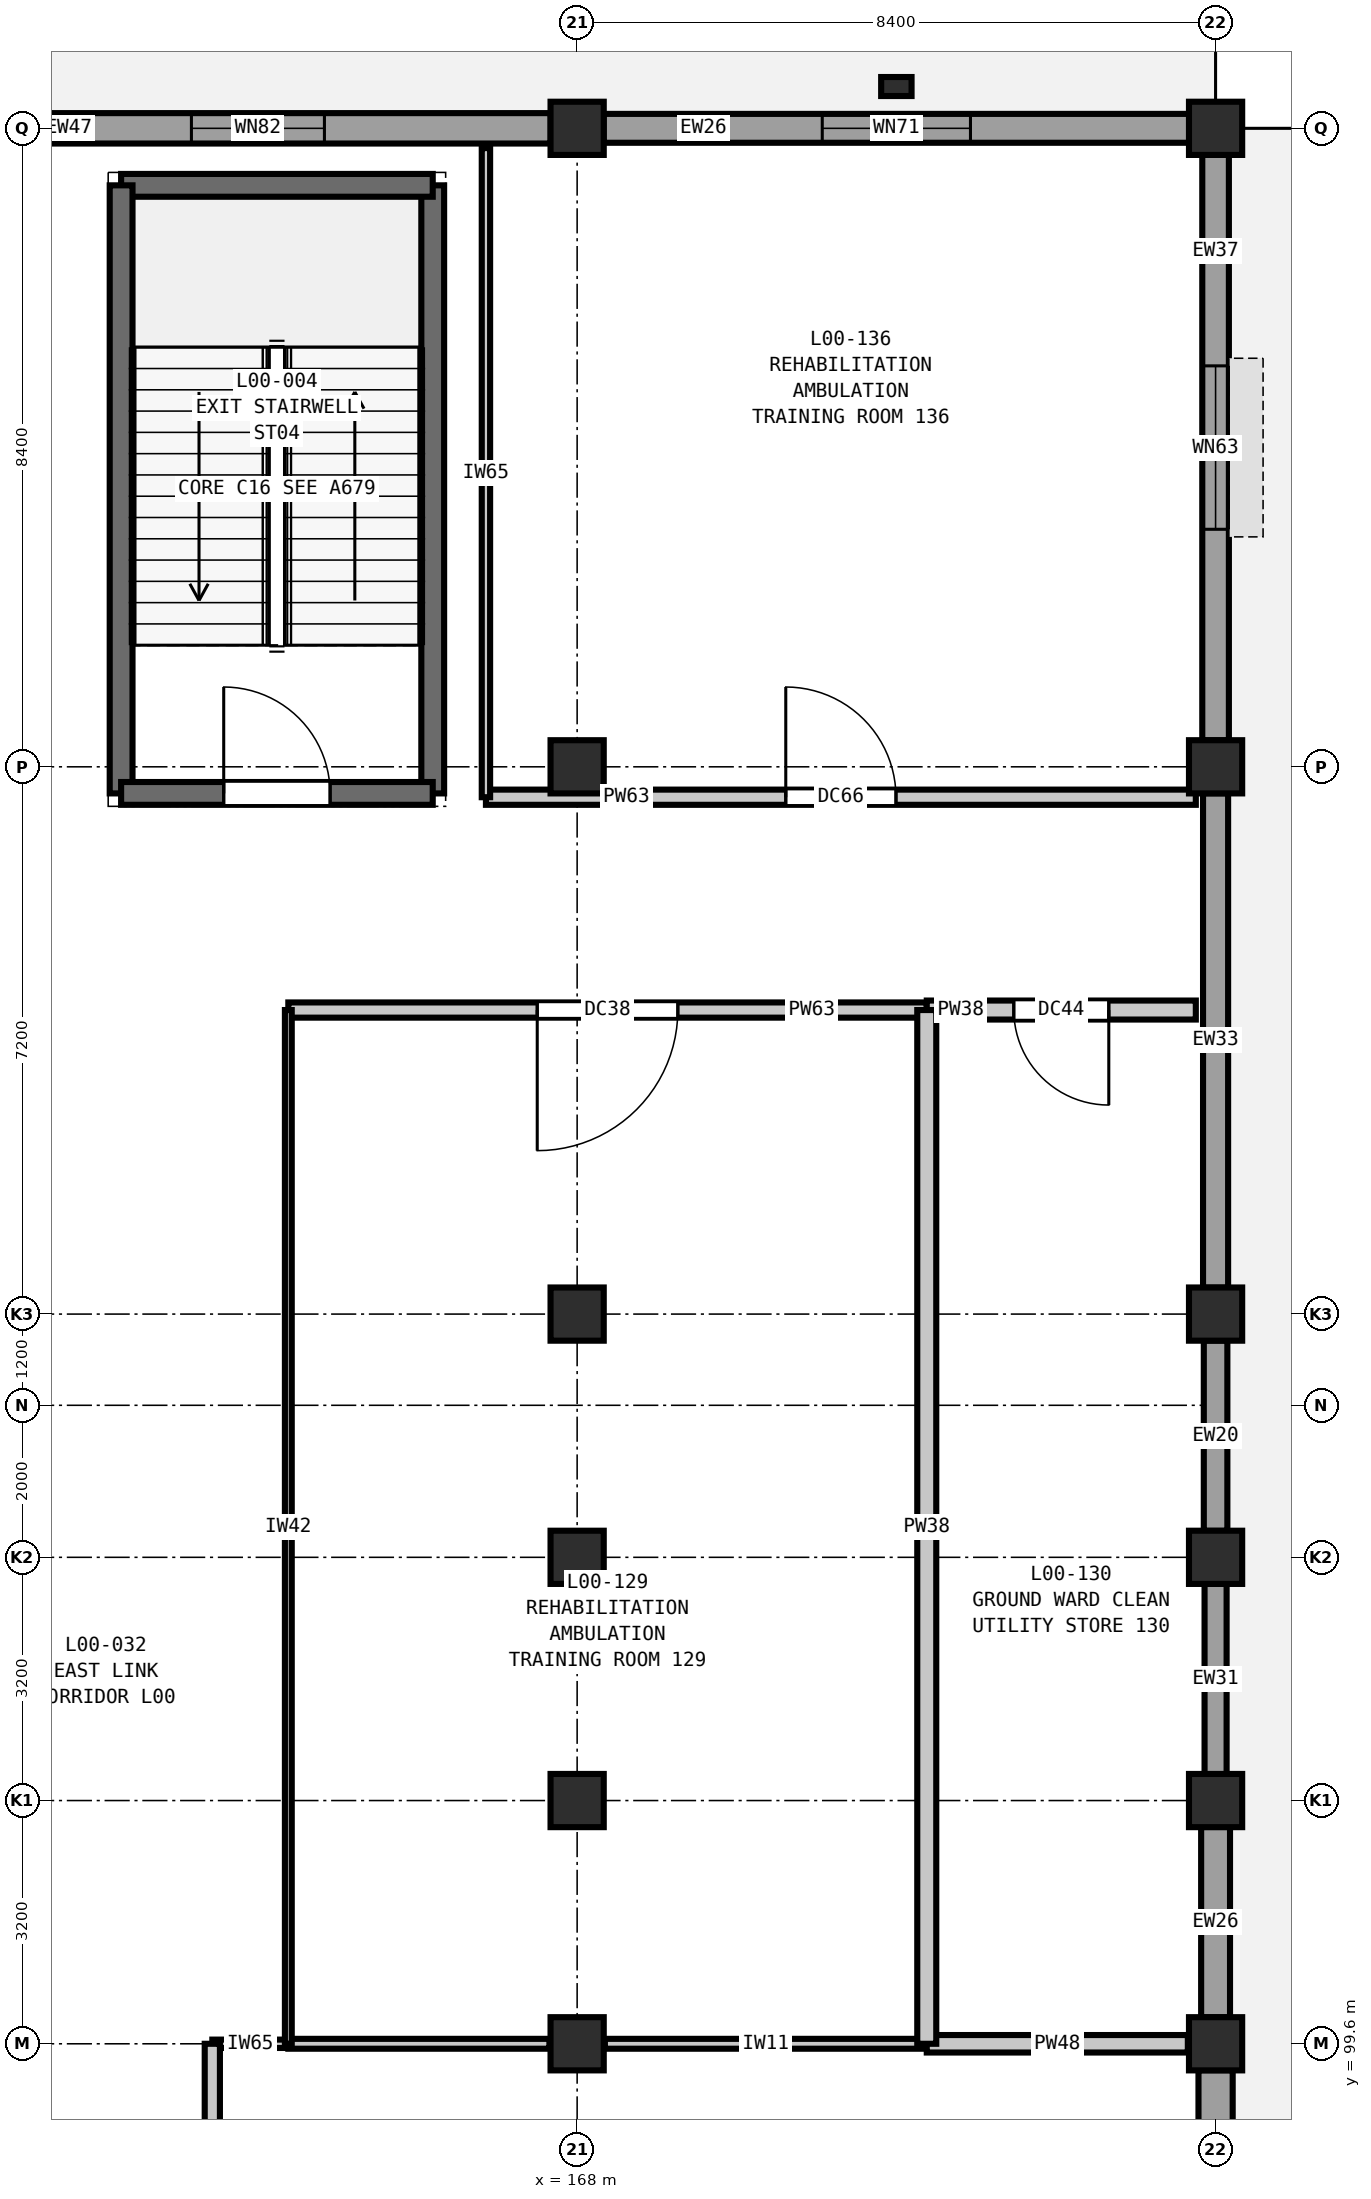
"""IFC4 building model, lengths in metres.
Left out: names, types, materials, properties, quantities, classifications, styles, units other than length and angle.
Written with IfcOpenShell. Run it as: python <this file> out.ifc"""

import sys

from ifc_helpers import new_model, si_unit, direction, frame, frame_2d, origin, origin_2d, place, context, subcontext, project, spatial, rectangle, extrude, element, fill, save


model = new_model("IFC4")
c1 = context("Model", 3, precision=1e-05, world=origin(), true_north=direction((0.0, 1.0)))
c2 = subcontext(c1, "Body", "Model", "MODEL_VIEW")
j1 = project(units=[si_unit("LENGTHUNIT", "METRE"), si_unit("PLANEANGLEUNIT", "RADIAN")], contexts=[c1])
p1 = place(None, origin())
s1 = spatial("IfcSite", under=j1, at=p1, CompositionType="ELEMENT")
p2 = place(p1, origin())
s2 = spatial("IfcBuilding", under=s1, at=p2, CompositionType="ELEMENT")
p3 = place(p2, origin())
s3 = spatial("IfcBuildingStorey", under=s2, at=p3, CompositionType="ELEMENT", Elevation=0.0)
for number, where, z_axis, x_axis in (
    (1, (168.0, 99.6, 0.0), (0.0, 0.0, 1.0), (1.0, 0.0, 0.0)),
    (2, (168.0, 102.8, 0.0), (0.0, 0.0, 1.0), (1.0, 0.0, 0.0)),
    (3, (168.0, 106.0, 0.0), (0.0, 0.0, 1.0), (1.0, 0.0, 0.0)),
    (4, (168.0, 109.2, 0.0), (0.0, 0.0, 1.0), (1.0, 0.0, 0.0)),
    (5, (168.0, 116.4, 0.0), (0.0, 0.0, 1.0), (1.0, 0.0, 0.0)),
    (6, (168.0, 124.8, 0.0), (0.0, 0.0, 1.0), (1.0, 0.0, 0.0)),
    (7, (176.4, 99.6, 0.0), (0.0, 0.0, 1.0), (1.0, 0.0, 0.0)),
    (8, (176.4, 102.8, 0.0), (0.0, 0.0, 1.0), (1.0, 0.0, 0.0)),
    (9, (176.4, 106.0, 0.0), (0.0, 0.0, 1.0), (1.0, 0.0, 0.0)),
    (10, (176.4, 109.2, 0.0), (0.0, 0.0, 1.0), (1.0, 0.0, 0.0)),
    (11, (176.4, 116.4, 0.0), (0.0, 0.0, 1.0), (1.0, 0.0, 0.0)),
    (12, (176.4, 124.8, 0.0), (0.0, 0.0, 1.0), (1.0, 0.0, 0.0)),
):
    element("IfcColumn", number, at=place(p3, frame(where, z_axis=z_axis, x_axis=x_axis)), inside=s3, PredefinedType="COLUMN", context=c2, shape_type="SweptSolid", body=[
        extrude(rectangle(XDim=0.7, YDim=0.7, at=origin_2d()), origin(), (0.0, 0.0, 1.0), 5.4),
    ])
p4 = place(p3, frame((172.2, 125.35, 0.0), z_axis=(0.0, 0.0, 1.0), x_axis=(1.0, 0.0, 0.0)))
e13 = element("IfcColumn", 13, at=p4, inside=s3, PredefinedType="PILASTER", context=c2, shape_type="SweptSolid", body=[
    extrude(rectangle(XDim=0.4, YDim=0.25, at=origin_2d()), origin(), (0.0, 0.0, 1.0), 5.4),
])
p5 = place(p3, frame((159.948, 124.8, 0.0), z_axis=(0.0, 0.0, 1.0), x_axis=(1.0, 0.0, 0.0)))
e14 = element("IfcWall", 14, at=p5, inside=s3, PredefinedType="SOLIDWALL", context=c2, shape_type="SweptSolid", body=[
    extrude(rectangle(XDim=7.704, YDim=0.4, at=frame_2d((3.852, 0.0))), origin(), (0.0, 0.0, 1.0), 4.68),
])
p6 = place(p5, frame((2.977, 0.0, 0.9)))
e15 = element("IfcOpeningElement", 15, at=p6, cuts=e14, PredefinedType="OPENING", context=c2, shape_type="SweptSolid", body=[
    extrude(rectangle(XDim=1.75, YDim=1.75, at=frame_2d((0.875, 0.875))), frame((0.0, 0.21, 0.0), z_axis=(0.0, -1.0, 0.0), x_axis=(1.0, 0.0, 0.0)), (0.0, 0.0, 1.0), 0.42),
])
p7 = place(p3, frame((168.348, 124.8, 0.0), z_axis=(0.0, 0.0, 1.0), x_axis=(1.0, 0.0, 0.0)))
e16 = element("IfcWall", 16, at=p7, inside=s3, PredefinedType="SOLIDWALL", context=c2, shape_type="SweptSolid", body=[
    extrude(rectangle(XDim=7.704, YDim=0.38, at=frame_2d((3.852, 0.0))), origin(), (0.0, 0.0, 1.0), 4.68),
])
p8 = place(p7, frame((2.877, 0.0, 0.9)))
e17 = element("IfcOpeningElement", 17, at=p8, cuts=e16, PredefinedType="OPENING", context=c2, shape_type="SweptSolid", body=[
    extrude(rectangle(XDim=1.95, YDim=1.75, at=frame_2d((0.975, 0.875))), frame((0.0, 0.2, 0.0), z_axis=(0.0, -1.0, 0.0), x_axis=(1.0, 0.0, 0.0)), (0.0, 0.0, 1.0), 0.4),
])
p9 = place(p3, frame((176.4, 124.452, 0.0), z_axis=(0.0, 0.0, 1.0), x_axis=(0.0, -1.0, 0.0)))
e18 = element("IfcWall", 18, at=p9, inside=s3, PredefinedType="SOLIDWALL", context=c2, shape_type="SweptSolid", body=[
    extrude(rectangle(XDim=7.704, YDim=0.35, at=frame_2d((3.852, 0.0))), origin(), (0.0, 0.0, 1.0), 4.68),
])
p10 = place(p9, frame((2.777, 0.0, 0.9)))
e19 = element("IfcOpeningElement", 19, at=p10, cuts=e18, PredefinedType="OPENING", context=c2, shape_type="SweptSolid", body=[
    extrude(rectangle(XDim=2.15, YDim=1.75, at=frame_2d((1.075, 0.875))), frame((0.0, 0.185, 0.0), z_axis=(0.0, -1.0, 0.0), x_axis=(1.0, 0.0, 0.0)), (0.0, 0.0, 1.0), 0.37),
])
p11 = place(p3, frame((176.4, 116.052, 0.0), z_axis=(0.0, 0.0, 1.0), x_axis=(0.0, -1.0, 0.0)))
e20 = element("IfcWall", 20, at=p11, inside=s3, PredefinedType="SOLIDWALL", context=c2, shape_type="SweptSolid", body=[
    extrude(rectangle(XDim=6.504, YDim=0.33, at=frame_2d((3.252, 0.0))), origin(), (0.0, 0.0, 1.0), 4.68),
])
p12 = place(p3, frame((176.4, 108.852, 0.0), z_axis=(0.0, 0.0, 1.0), x_axis=(0.0, -1.0, 0.0)))
e21 = element("IfcWall", 21, at=p12, inside=s3, PredefinedType="SOLIDWALL", context=c2, shape_type="SweptSolid", body=[
    extrude(rectangle(XDim=2.504, YDim=0.31, at=frame_2d((1.252, 0.0))), origin(), (0.0, 0.0, 1.0), 4.68),
])
p13 = place(p3, frame((176.4, 105.652, 0.0), z_axis=(0.0, 0.0, 1.0), x_axis=(0.0, -1.0, 0.0)))
e22 = element("IfcWall", 22, at=p13, inside=s3, PredefinedType="SOLIDWALL", context=c2, shape_type="SweptSolid", body=[
    extrude(rectangle(XDim=2.504, YDim=0.29, at=frame_2d((1.252, 0.0))), origin(), (0.0, 0.0, 1.0), 4.68),
])
p14 = place(p3, frame((176.4, 102.452, 0.0), z_axis=(0.0, 0.0, 1.0), x_axis=(0.0, -1.0, 0.0)))
e23 = element("IfcWall", 23, at=p14, inside=s3, PredefinedType="SOLIDWALL", context=c2, shape_type="SweptSolid", body=[
    extrude(rectangle(XDim=2.504, YDim=0.38, at=frame_2d((1.252, 0.0))), origin(), (0.0, 0.0, 1.0), 4.68),
])
p15 = place(p3, frame((176.4, 99.252, 0.0), z_axis=(0.0, 0.0, 1.0), x_axis=(0.0, -1.0, 0.0)))
e24 = element("IfcWall", 24, at=p15, inside=s3, PredefinedType="SOLIDWALL", context=c2, shape_type="SweptSolid", body=[
    extrude(rectangle(XDim=7.704, YDim=0.45, at=frame_2d((3.852, 0.0))), origin(), (0.0, 0.0, 1.0), 4.68),
])
p16 = place(p15, frame((2.677, 0.0, 0.9)))
e25 = element("IfcOpeningElement", 25, at=p16, cuts=e24, PredefinedType="OPENING", context=c2, shape_type="SweptSolid", body=[
    extrude(rectangle(XDim=2.35, YDim=1.75, at=frame_2d((1.175, 0.875))), frame((0.0, 0.235, 0.0), z_axis=(0.0, -1.0, 0.0), x_axis=(1.0, 0.0, 0.0)), (0.0, 0.0, 1.0), 0.47),
])
p17 = place(p3, frame((166.1, 116.05, 0.0), z_axis=(0.0, 0.0, 1.0), x_axis=(0.0, 1.0, 0.0)))
e26 = element("IfcWall", 26, at=p17, inside=s3, PredefinedType="SHEAR", context=c2, shape_type="SweptSolid", body=[
    extrude(rectangle(XDim=8.0, YDim=0.3, at=frame_2d((4.0, 0.0))), origin(), (0.0, 0.0, 1.0), 5.4),
])
p18 = place(p3, frame((166.1, 124.05, 0.0), z_axis=(0.0, 0.0, 1.0), x_axis=(-1.0, 0.0, 0.0)))
e27 = element("IfcWall", 27, at=p18, inside=s3, PredefinedType="SHEAR", context=c2, shape_type="SweptSolid", body=[
    extrude(rectangle(XDim=4.1, YDim=0.3, at=frame_2d((2.05, 0.0))), origin(), (0.0, 0.0, 1.0), 5.4),
])
p19 = place(p3, frame((162.0, 124.05, 0.0), z_axis=(0.0, 0.0, 1.0), x_axis=(0.0, -1.0, 0.0)))
e28 = element("IfcWall", 28, at=p19, inside=s3, PredefinedType="SHEAR", context=c2, shape_type="SweptSolid", body=[
    extrude(rectangle(XDim=8.0, YDim=0.3, at=frame_2d((4.0, 0.0))), origin(), (0.0, 0.0, 1.0), 5.4),
])
p20 = place(p3, frame((162.0, 116.05, 0.0), z_axis=(0.0, 0.0, 1.0), x_axis=(1.0, 0.0, 0.0)))
e29 = element("IfcWall", 29, at=p20, inside=s3, PredefinedType="SHEAR", context=c2, shape_type="SweptSolid", body=[
    extrude(rectangle(XDim=4.1, YDim=0.3, at=frame_2d((2.05, 0.0))), origin(), (0.0, 0.0, 1.0), 5.4),
])
p21 = place(p20, frame((1.35, 0.0, 0.0)))
e30 = element("IfcOpeningElement", 30, at=p21, cuts=e29, PredefinedType="OPENING", context=c2, shape_type="SweptSolid", body=[
    extrude(rectangle(XDim=1.4, YDim=2.2, at=frame_2d((0.7, 1.1))), frame((0.0, 0.16, 0.0), z_axis=(0.0, -1.0, 0.0), x_axis=(1.0, 0.0, 0.0)), (0.0, 0.0, 1.0), 0.32),
])
p22 = place(p3, frame((163.2, 99.6, 0.0), z_axis=(0.0, 0.0, 1.0), x_axis=(1.0, 0.0, 0.0)))
e31 = element("IfcWall", 31, at=p22, inside=s3, PredefinedType="PARTITIONING", context=c2, shape_type="SweptSolid", body=[
    extrude(rectangle(XDim=1.0, YDim=0.11, at=frame_2d((0.5, 0.0))), origin(), (0.0, 0.0, 1.0), 4.635),
])
p23 = place(p3, frame((168.365, 99.6, 0.0), z_axis=(0.0, 0.0, 1.0), x_axis=(1.0, 0.0, 0.0)))
e32 = element("IfcWall", 32, at=p23, inside=s3, PredefinedType="PARTITIONING", context=c2, shape_type="SweptSolid", body=[
    extrude(rectangle(XDim=4.235, YDim=0.13, at=frame_2d((2.118, 0.0))), origin(), (0.0, 0.0, 1.0), 4.635),
])
p24 = place(p3, frame((164.2, 99.6, 0.0), z_axis=(0.0, 0.0, 1.0), x_axis=(1.0, 0.0, 0.0)))
e33 = element("IfcWall", 33, at=p24, inside=s3, PredefinedType="PARTITIONING", context=c2, shape_type="SweptSolid", body=[
    extrude(rectangle(XDim=3.435, YDim=0.13, at=frame_2d((1.718, 0.0))), origin(), (0.0, 0.0, 1.0), 4.635),
])
p25 = place(p3, frame((172.6, 99.6, 0.0), z_axis=(0.0, 0.0, 1.0), x_axis=(1.0, 0.0, 0.0)))
e34 = element("IfcWall", 34, at=p25, inside=s3, PredefinedType="PARTITIONING", context=c2, shape_type="SweptSolid", body=[
    extrude(rectangle(XDim=3.435, YDim=0.23, at=frame_2d((1.717, 0.0))), origin(), (0.0, 0.0, 1.0), 4.635),
])
p26 = place(p3, frame((164.2, 113.2, 0.0), z_axis=(0.0, 0.0, 1.0), x_axis=(1.0, 0.0, 0.0)))
e35 = element("IfcWall", 35, at=p26, inside=s3, PredefinedType="PARTITIONING", context=c2, shape_type="SweptSolid", body=[
    extrude(rectangle(XDim=8.4, YDim=0.2, at=frame_2d((4.2, 0.0))), origin(), (0.0, 0.0, 1.0), 5.04),
])
p27 = place(p26, frame((3.275, 0.0, 0.0)))
e36 = element("IfcOpeningElement", 36, at=p27, cuts=e35, PredefinedType="OPENING", context=c2, shape_type="SweptSolid", body=[
    extrude(rectangle(XDim=1.85, YDim=2.3, at=frame_2d((0.925, 1.15))), frame((0.0, 0.11, 0.0), z_axis=(0.0, -1.0, 0.0), x_axis=(1.0, 0.0, 0.0)), (0.0, 0.0, 1.0), 0.22),
])
p28 = place(p3, frame((172.6, 113.2, 0.0), z_axis=(0.0, 0.0, 1.0), x_axis=(1.0, 0.0, 0.0)))
e37 = element("IfcWall", 37, at=p28, inside=s3, PredefinedType="PARTITIONING", context=c2, shape_type="SweptSolid", body=[
    extrude(rectangle(XDim=3.54, YDim=0.25, at=frame_2d((1.77, 0.0))), origin(), (0.0, 0.0, 1.0), 5.04),
])
p29 = place(p28, frame((1.145, 0.0, 0.0)))
e38 = element("IfcOpeningElement", 38, at=p29, cuts=e37, PredefinedType="OPENING", context=c2, shape_type="SweptSolid", body=[
    extrude(rectangle(XDim=1.25, YDim=2.15, at=frame_2d((0.625, 1.075))), frame((0.0, 0.135, 0.0), z_axis=(0.0, -1.0, 0.0), x_axis=(1.0, 0.0, 0.0)), (0.0, 0.0, 1.0), 0.27),
])
p30 = place(p3, frame((166.8, 116.0, 0.0), z_axis=(0.0, 0.0, 1.0), x_axis=(1.0, 0.0, 0.0)))
e39 = element("IfcWall", 39, at=p30, inside=s3, PredefinedType="PARTITIONING", context=c2, shape_type="SweptSolid", body=[
    extrude(rectangle(XDim=9.34, YDim=0.2, at=frame_2d((4.67, 0.0))), origin(), (0.0, 0.0, 1.0), 5.04),
])
p31 = place(p30, frame((3.945, 0.0, 0.0)))
e40 = element("IfcOpeningElement", 40, at=p31, cuts=e39, PredefinedType="OPENING", context=c2, shape_type="SweptSolid", body=[
    extrude(rectangle(XDim=1.45, YDim=2.25, at=frame_2d((0.725, 1.125))), frame((0.0, 0.11, 0.0), z_axis=(0.0, -1.0, 0.0), x_axis=(1.0, 0.0, 0.0)), (0.0, 0.0, 1.0), 0.22),
])
p32 = place(p3, frame((163.2, 89.2, 0.0), z_axis=(0.0, 0.0, 1.0), x_axis=(0.0, 1.0, 0.0)))
e41 = element("IfcWall", 41, at=p32, inside=s3, PredefinedType="PARTITIONING", context=c2, shape_type="SweptSolid", body=[
    extrude(rectangle(XDim=10.4, YDim=0.2, at=frame_2d((5.2, 0.0))), origin(), (0.0, 0.0, 1.0), 5.04),
])
p33 = place(p32, frame((4.35, 0.0, 0.0)))
e42 = element("IfcOpeningElement", 42, at=p33, cuts=e41, PredefinedType="OPENING", context=c2, shape_type="SweptSolid", body=[
    extrude(rectangle(XDim=1.7, YDim=2.3, at=frame_2d((0.85, 1.15))), frame((0.0, 0.11, 0.0), z_axis=(0.0, -1.0, 0.0), x_axis=(1.0, 0.0, 0.0)), (0.0, 0.0, 1.0), 0.22),
])
p34 = place(p3, frame((164.2, 99.6, 0.0), z_axis=(0.0, 0.0, 1.0), x_axis=(0.0, 1.0, 0.0)))
e43 = element("IfcWall", 43, at=p34, inside=s3, PredefinedType="PARTITIONING", context=c2, shape_type="SweptSolid", body=[
    extrude(rectangle(XDim=13.6, YDim=0.09, at=frame_2d((6.8, 0.0))), origin(), (0.0, 0.0, 1.0), 5.04),
])
p35 = place(p3, frame((166.8, 116.0, 0.0), z_axis=(0.0, 0.0, 1.0), x_axis=(0.0, 1.0, 0.0)))
e44 = element("IfcWall", 44, at=p35, inside=s3, PredefinedType="PARTITIONING", context=c2, shape_type="SweptSolid", body=[
    extrude(rectangle(XDim=8.54, YDim=0.11, at=frame_2d((4.27, 0.0))), origin(), (0.0, 0.0, 1.0), 5.04),
])
p36 = place(p3, frame((172.6, 99.6, 0.0), z_axis=(0.0, 0.0, 1.0), x_axis=(0.0, 1.0, 0.0)))
e45 = element("IfcWall", 45, at=p36, inside=s3, PredefinedType="PARTITIONING", context=c2, shape_type="SweptSolid", body=[
    extrude(rectangle(XDim=13.6, YDim=0.25, at=frame_2d((6.8, 0.0))), origin(), (0.0, 0.0, 1.0), 5.04),
])
p37 = place(p6, origin())
e46 = element("IfcWindow", 46, at=p37, inside=s3, PartitioningType="DOUBLE_PANEL_VERTICAL", PredefinedType="WINDOW", context=c2, shape_type="SweptSolid", body=[
    extrude(rectangle(XDim=1.75, YDim=1.75, at=frame_2d((0.875, 0.875))), frame((0.0, 0.03, 0.0), z_axis=(0.0, -1.0, 0.0), x_axis=(1.0, 0.0, 0.0)), (0.0, 0.0, 1.0), 0.06),
])
fill(e15, e46)
p38 = place(p8, origin())
e47 = element("IfcWindow", 47, at=p38, inside=s3, PartitioningType="DOUBLE_PANEL_VERTICAL", PredefinedType="WINDOW", context=c2, shape_type="SweptSolid", body=[
    extrude(rectangle(XDim=1.95, YDim=1.75, at=frame_2d((0.975, 0.875))), frame((0.0, 0.03, 0.0), z_axis=(0.0, -1.0, 0.0), x_axis=(1.0, 0.0, 0.0)), (0.0, 0.0, 1.0), 0.06),
])
fill(e17, e47)
p39 = place(p10, origin())
e48 = element("IfcWindow", 48, at=p39, inside=s3, PartitioningType="DOUBLE_PANEL_VERTICAL", PredefinedType="WINDOW", context=c2, shape_type="SweptSolid", body=[
    extrude(rectangle(XDim=2.15, YDim=1.75, at=frame_2d((1.075, 0.875))), frame((0.0, 0.03, 0.0), z_axis=(0.0, -1.0, 0.0), x_axis=(1.0, 0.0, 0.0)), (0.0, 0.0, 1.0), 0.06),
])
fill(e19, e48)
p40 = place(p21, origin())
e49 = element("IfcDoor", 49, at=p40, inside=s3, OperationType="SINGLE_SWING_LEFT", PredefinedType="DOOR", context=c2, shape_type="SweptSolid", body=[
    extrude(rectangle(XDim=1.4, YDim=2.2, at=frame_2d((0.7, 1.1))), frame((0.0, 0.025, 0.0), z_axis=(0.0, -1.0, 0.0), x_axis=(1.0, 0.0, 0.0)), (0.0, 0.0, 1.0), 0.05),
])
fill(e30, e49)
p41 = place(p27, frame((1.85, 0.0, 0.0), z_axis=(0.0, 0.0, 1.0), x_axis=(-1.0, 0.0, 0.0)))
e50 = element("IfcDoor", 50, at=p41, inside=s3, OperationType="SINGLE_SWING_RIGHT", PredefinedType="DOOR", context=c2, shape_type="SweptSolid", body=[
    extrude(rectangle(XDim=1.85, YDim=2.3, at=frame_2d((0.925, 1.15))), frame((0.0, 0.025, 0.0), z_axis=(0.0, -1.0, 0.0), x_axis=(1.0, 0.0, 0.0)), (0.0, 0.0, 1.0), 0.05),
])
fill(e36, e50)
p42 = place(p29, frame((1.25, 0.0, 0.0), z_axis=(0.0, 0.0, 1.0), x_axis=(-1.0, 0.0, 0.0)))
e51 = element("IfcDoor", 51, at=p42, inside=s3, OperationType="SINGLE_SWING_LEFT", PredefinedType="DOOR", context=c2, shape_type="SweptSolid", body=[
    extrude(rectangle(XDim=1.25, YDim=2.15, at=frame_2d((0.625, 1.075))), frame((0.0, 0.025, 0.0), z_axis=(0.0, -1.0, 0.0), x_axis=(1.0, 0.0, 0.0)), (0.0, 0.0, 1.0), 0.05),
])
fill(e38, e51)
p43 = place(p31, origin())
e52 = element("IfcDoor", 52, at=p43, inside=s3, OperationType="SINGLE_SWING_LEFT", PredefinedType="DOOR", context=c2, shape_type="SweptSolid", body=[
    extrude(rectangle(XDim=1.45, YDim=2.25, at=frame_2d((0.725, 1.125))), frame((0.0, 0.025, 0.0), z_axis=(0.0, -1.0, 0.0), x_axis=(1.0, 0.0, 0.0)), (0.0, 0.0, 1.0), 0.05),
])
fill(e40, e52)
save(model, sys.argv[1])
